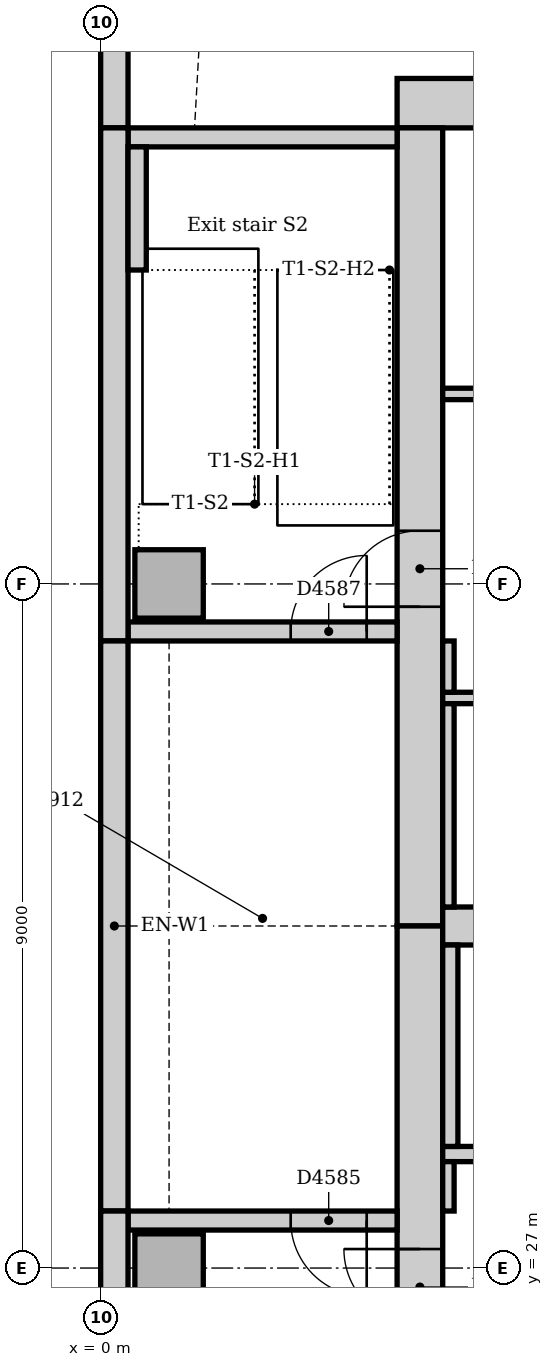
"""IFC4 building model, lengths in metres.
Left out: names, types, materials, properties, quantities, classifications, styles, units other than length and angle.
Written with IfcOpenShell. Run it as: python <this file> out.ifc"""

import sys

from ifc_helpers import new_model, si_unit, direction, frame, frame_2d, origin, origin_2d, place, context, subcontext, project, spatial, rectangle, extrude, element, fill, save


model = new_model("IFC4")
c1 = context("Model", 3, precision=1e-05, world=origin(), true_north=direction((0.0, 1.0)))
c2 = subcontext(c1, "Body", "Model", "MODEL_VIEW")
j1 = project(units=[si_unit("LENGTHUNIT", "METRE"), si_unit("PLANEANGLEUNIT", "RADIAN")], contexts=[c1])
p1 = place(None, origin())
s1 = spatial("IfcSite", under=j1, at=p1, CompositionType="ELEMENT")
p2 = place(p1, origin())
s2 = spatial("IfcBuilding", under=s1, at=p2, CompositionType="ELEMENT")
p3 = place(p2, frame((0.0, 0.0, 165.0)))
s3 = spatial("IfcBuildingStorey", under=s2, at=p3, CompositionType="ELEMENT", Elevation=165.0)
p4 = place(p3, frame((23.15, 42.325, 0.0), z_axis=(0.0, 0.0, 1.0), x_axis=(-1.0, 0.0, 0.0)))
e1 = element("IfcWall", 1, at=p4, inside=s3, PredefinedType="SOLIDWALL", context=c2, shape_type="SweptSolid", body=[
    extrude(rectangle(XDim=19.25, YDim=0.65, at=frame_2d((9.625, 0.0))), origin(), (0.0, 0.0, 1.0), 4.0),
])
p5 = place(p3, frame((4.2, 42.0, 0.0), z_axis=(0.0, 0.0, 1.0), x_axis=(0.0, -1.0, 0.0)))
e2 = element("IfcWall", 2, at=p5, inside=s3, PredefinedType="SOLIDWALL", context=c2, shape_type="SweptSolid", body=[
    extrude(rectangle(XDim=10.5, YDim=0.6, at=frame_2d((5.25, 0.0))), origin(), (0.0, 0.0, 1.0), 4.0),
])
p6 = place(p5, frame((5.3, 0.0, 0.0)))
e3 = element("IfcOpeningElement", 3, at=p6, cuts=e2, PredefinedType="OPENING", context=c2, shape_type="SweptSolid", body=[
    extrude(rectangle(XDim=1.0, YDim=2.1, at=frame_2d((0.5, 1.05))), frame((0.0, 0.31, 0.0), z_axis=(0.0, -1.0, 0.0), x_axis=(1.0, 0.0, 0.0)), (0.0, 0.0, 1.0), 0.62),
])
p7 = place(p3, frame((4.2, 31.5, 0.0), z_axis=(0.0, 0.0, 1.0), x_axis=(0.0, -1.0, 0.0)))
e4 = element("IfcWall", 4, at=p7, inside=s3, PredefinedType="SOLIDWALL", context=c2, shape_type="SweptSolid", body=[
    extrude(rectangle(XDim=10.5, YDim=0.6, at=frame_2d((5.25, 0.0))), origin(), (0.0, 0.0, 1.0), 4.0),
])
p8 = place(p7, frame((4.25, 0.0, 0.0)))
e5 = element("IfcOpeningElement", 5, at=p8, cuts=e4, PredefinedType="OPENING", context=c2, shape_type="SweptSolid", body=[
    extrude(rectangle(XDim=1.0, YDim=2.1, at=frame_2d((0.5, 1.05))), frame((0.0, 0.31, 0.0), z_axis=(0.0, -1.0, 0.0), x_axis=(1.0, 0.0, 0.0)), (0.0, 0.0, 1.0), 0.62),
])
p9 = place(p3, frame((4.5, 31.5, 0.0), z_axis=(0.0, 0.0, 1.0), x_axis=(1.0, 0.0, 0.0)))
e6 = element("IfcWall", 6, at=p9, inside=s3, PredefinedType="SOLIDWALL", context=c2, shape_type="SweptSolid", body=[
    extrude(rectangle(XDim=18.0, YDim=0.5, at=frame_2d((9.0, 0.0))), origin(), (0.0, 0.0, 1.0), 4.0),
])
p10 = place(p3, frame((3.9, 27.625, 0.0), z_axis=(0.0, 0.0, 1.0), x_axis=(-1.0, 0.0, 0.0)))
e7 = element("IfcWall", 7, at=p10, inside=s3, PredefinedType="SOLIDWALL", context=c2, shape_type="SweptSolid", body=[
    extrude(rectangle(XDim=3.54, YDim=0.25, at=frame_2d((1.77, 0.0))), origin(), (0.0, 0.0, 1.0), 4.0),
])
p11 = place(p10, frame((0.4, 0.0, 0.0)))
e8 = element("IfcOpeningElement", 8, at=p11, cuts=e7, PredefinedType="OPENING", context=c2, shape_type="SweptSolid", body=[
    extrude(rectangle(XDim=1.0, YDim=2.1, at=frame_2d((0.5, 1.05))), frame((0.0, 0.135, 0.0), z_axis=(0.0, -1.0, 0.0), x_axis=(1.0, 0.0, 0.0)), (0.0, 0.0, 1.0), 0.27),
])
p12 = place(p3, frame((0.36, 35.375, 0.0), z_axis=(0.0, 0.0, 1.0), x_axis=(1.0, 0.0, 0.0)))
e9 = element("IfcWall", 9, at=p12, inside=s3, PredefinedType="SOLIDWALL", context=c2, shape_type="SweptSolid", body=[
    extrude(rectangle(XDim=3.54, YDim=0.25, at=frame_2d((1.77, 0.0))), origin(), (0.0, 0.0, 1.0), 4.0),
])
p13 = place(p12, frame((2.14, 0.0, 0.0)))
e10 = element("IfcOpeningElement", 10, at=p13, cuts=e9, PredefinedType="OPENING", context=c2, shape_type="SweptSolid", body=[
    extrude(rectangle(XDim=1.0, YDim=2.1, at=frame_2d((0.5, 1.05))), frame((0.0, 0.135, 0.0), z_axis=(0.0, -1.0, 0.0), x_axis=(1.0, 0.0, 0.0)), (0.0, 0.0, 1.0), 0.27),
])
p14 = place(p3, frame((3.9, 41.875, 0.0), z_axis=(0.0, 0.0, 1.0), x_axis=(-1.0, 0.0, 0.0)))
e11 = element("IfcWall", 11, at=p14, inside=s3, PredefinedType="SOLIDWALL", context=c2, shape_type="SweptSolid", body=[
    extrude(rectangle(XDim=3.54, YDim=0.25, at=frame_2d((1.77, 0.0))), origin(), (0.0, 0.0, 1.0), 4.0),
])
for number, where, z_axis, x_axis in (
    (12, (0.9, 27.0, 0.0), (0.0, 0.0, 1.0), (1.0, 0.0, 0.0)),
    (13, (0.9, 36.0, 0.0), (0.0, 0.0, 1.0), (1.0, 0.0, 0.0)),
):
    element("IfcColumn", number, at=place(p3, frame(where, z_axis=z_axis, x_axis=x_axis)), inside=s3, PredefinedType="COLUMN", context=c2, shape_type="SweptSolid", body=[
        extrude(rectangle(XDim=0.9, YDim=0.9, at=origin_2d()), origin(), (0.0, 0.0, 1.0), 4.0),
    ])
p15 = place(p3, frame((0.18, 49.757, 0.0), z_axis=(0.0, 0.0, 1.0), x_axis=(0.0, -1.0, 0.0)))
e14 = element("IfcWall", 14, at=p15, inside=s3, PredefinedType="STANDARD", context=c2, shape_type="SweptSolid", body=[
    extrude(rectangle(XDim=7.757, YDim=0.36, at=frame_2d((3.879, 0.0))), origin(), (0.0, 0.0, 1.0), 3.85),
])
p16 = place(p15, frame((3.107, 0.0, 0.9)))
e15 = element("IfcOpeningElement", 15, at=p16, cuts=e14, PredefinedType="OPENING", context=c2, shape_type="SweptSolid", body=[
    extrude(rectangle(XDim=3.3, YDim=1.6, at=frame_2d((1.65, 0.8))), frame((0.0, 0.19, 0.0), z_axis=(0.0, -1.0, 0.0), x_axis=(1.0, 0.0, 0.0)), (0.0, 0.0, 1.0), 0.38),
])
p17 = place(p3, frame((0.18, 42.0, 0.0), z_axis=(0.0, 0.0, 1.0), x_axis=(0.0, -1.0, 0.0)))
e16 = element("IfcWall", 16, at=p17, inside=s3, PredefinedType="STANDARD", context=c2, shape_type="SweptSolid", body=[
    extrude(rectangle(XDim=6.75, YDim=0.36, at=frame_2d((3.375, 0.0))), origin(), (0.0, 0.0, 1.0), 3.85),
])
p18 = place(p3, frame((0.18, 35.25, 0.0), z_axis=(0.0, 0.0, 1.0), x_axis=(0.0, -1.0, 0.0)))
e17 = element("IfcWall", 17, at=p18, inside=s3, PredefinedType="STANDARD", context=c2, shape_type="SweptSolid", body=[
    extrude(rectangle(XDim=7.5, YDim=0.36, at=frame_2d((3.75, 0.0))), origin(), (0.0, 0.0, 1.0), 3.85),
])
p19 = place(p3, frame((0.18, 27.75, 0.0), z_axis=(0.0, 0.0, 1.0), x_axis=(0.0, -1.0, 0.0)))
e18 = element("IfcWall", 18, at=p19, inside=s3, PredefinedType="STANDARD", context=c2, shape_type="SweptSolid", body=[
    extrude(rectangle(XDim=6.75, YDim=0.36, at=frame_2d((3.375, 0.0))), origin(), (0.0, 0.0, 1.0), 3.85),
])
p20 = place(p3, frame((0.48, 40.13, 0.0), z_axis=(0.0, 0.0, 1.0), x_axis=(0.0, 1.0, 0.0)))
e19 = element("IfcWall", 19, at=p20, inside=s3, PredefinedType="STANDARD", context=c2, shape_type="SweptSolid", body=[
    extrude(rectangle(XDim=1.62, YDim=0.24, at=frame_2d((0.81, 0.0))), origin(), (0.0, 0.0, 1.0), 4.0),
])
p21 = place(p3, frame((4.5, 28.5, 0.0), z_axis=(0.0, 0.0, 1.0), x_axis=(1.0, 0.0, 0.0)))
e20 = element("IfcWall", 20, at=p21, inside=s3, PredefinedType="PARTITIONING", context=c2, shape_type="SweptSolid", body=[
    extrude(rectangle(XDim=18.0, YDim=0.2, at=frame_2d((9.0, 0.0))), origin(), (0.0, 0.0, 1.0), 3.85),
])
p22 = place(p21, frame((0.95, 0.0, 0.0)))
e21 = element("IfcOpeningElement", 21, at=p22, cuts=e20, PredefinedType="OPENING", context=c2, shape_type="SweptSolid", body=[
    extrude(rectangle(XDim=1.1, YDim=2.1, at=frame_2d((0.55, 1.05))), frame((0.0, 0.11, 0.0), z_axis=(0.0, -1.0, 0.0), x_axis=(1.0, 0.0, 0.0)), (0.0, 0.0, 1.0), 0.22),
])
p23 = place(p21, frame((3.95, 0.0, 0.0)))
e22 = element("IfcOpeningElement", 22, at=p23, cuts=e20, PredefinedType="OPENING", context=c2, shape_type="SweptSolid", body=[
    extrude(rectangle(XDim=1.1, YDim=2.1, at=frame_2d((0.55, 1.05))), frame((0.0, 0.11, 0.0), z_axis=(0.0, -1.0, 0.0), x_axis=(1.0, 0.0, 0.0)), (0.0, 0.0, 1.0), 0.22),
])
p24 = place(p21, frame((6.95, 0.0, 0.0)))
e23 = element("IfcOpeningElement", 23, at=p24, cuts=e20, PredefinedType="OPENING", context=c2, shape_type="SweptSolid", body=[
    extrude(rectangle(XDim=1.1, YDim=2.1, at=frame_2d((0.55, 1.05))), frame((0.0, 0.11, 0.0), z_axis=(0.0, -1.0, 0.0), x_axis=(1.0, 0.0, 0.0)), (0.0, 0.0, 1.0), 0.22),
])
p25 = place(p21, frame((9.95, 0.0, 0.0)))
e24 = element("IfcOpeningElement", 24, at=p25, cuts=e20, PredefinedType="OPENING", context=c2, shape_type="SweptSolid", body=[
    extrude(rectangle(XDim=1.1, YDim=2.1, at=frame_2d((0.55, 1.05))), frame((0.0, 0.11, 0.0), z_axis=(0.0, -1.0, 0.0), x_axis=(1.0, 0.0, 0.0)), (0.0, 0.0, 1.0), 0.22),
])
p26 = place(p21, frame((12.95, 0.0, 0.0)))
e25 = element("IfcOpeningElement", 25, at=p26, cuts=e20, PredefinedType="OPENING", context=c2, shape_type="SweptSolid", body=[
    extrude(rectangle(XDim=1.1, YDim=2.1, at=frame_2d((0.55, 1.05))), frame((0.0, 0.11, 0.0), z_axis=(0.0, -1.0, 0.0), x_axis=(1.0, 0.0, 0.0)), (0.0, 0.0, 1.0), 0.22),
])
p27 = place(p21, frame((15.95, 0.0, 0.0)))
e26 = element("IfcOpeningElement", 26, at=p27, cuts=e20, PredefinedType="OPENING", context=c2, shape_type="SweptSolid", body=[
    extrude(rectangle(XDim=1.1, YDim=2.1, at=frame_2d((0.55, 1.05))), frame((0.0, 0.11, 0.0), z_axis=(0.0, -1.0, 0.0), x_axis=(1.0, 0.0, 0.0)), (0.0, 0.0, 1.0), 0.22),
])
p28 = place(p3, frame((4.6, 28.6, 0.0), z_axis=(0.0, 0.0, 1.0), x_axis=(0.0, 1.0, 0.0)))
e27 = element("IfcWall", 27, at=p28, inside=s3, PredefinedType="PARTITIONING", context=c2, shape_type="SweptSolid", body=[
    extrude(rectangle(XDim=2.65, YDim=0.2, at=frame_2d((1.325, 0.0))), origin(), (0.0, 0.0, 1.0), 3.85),
])
p29 = place(p3, frame((4.5, 38.5, 0.0), z_axis=(0.0, 0.0, 1.0), x_axis=(1.0, 0.0, 0.0)))
e28 = element("IfcWall", 28, at=p29, inside=s3, PredefinedType="PARTITIONING", context=c2, shape_type="SweptSolid", body=[
    extrude(rectangle(XDim=11.9, YDim=0.15, at=frame_2d((5.95, 0.0))), origin(), (0.0, 0.0, 1.0), 3.85),
])
p30 = place(p29, frame((1.1, 0.0, 0.0)))
e29 = element("IfcOpeningElement", 29, at=p30, cuts=e28, PredefinedType="OPENING", context=c2, shape_type="SweptSolid", body=[
    extrude(rectangle(XDim=0.9, YDim=2.1, at=frame_2d((0.45, 1.05))), frame((0.0, 0.085, 0.0), z_axis=(0.0, -1.0, 0.0), x_axis=(1.0, 0.0, 0.0)), (0.0, 0.0, 1.0), 0.17),
])
p31 = place(p29, frame((4.05, 0.0, 0.0)))
e30 = element("IfcOpeningElement", 30, at=p31, cuts=e28, PredefinedType="OPENING", context=c2, shape_type="SweptSolid", body=[
    extrude(rectangle(XDim=0.9, YDim=2.1, at=frame_2d((0.45, 1.05))), frame((0.0, 0.085, 0.0), z_axis=(0.0, -1.0, 0.0), x_axis=(1.0, 0.0, 0.0)), (0.0, 0.0, 1.0), 0.17),
])
p32 = place(p29, frame((7.05, 0.0, 0.0)))
e31 = element("IfcOpeningElement", 31, at=p32, cuts=e28, PredefinedType="OPENING", context=c2, shape_type="SweptSolid", body=[
    extrude(rectangle(XDim=0.9, YDim=2.1, at=frame_2d((0.45, 1.05))), frame((0.0, 0.085, 0.0), z_axis=(0.0, -1.0, 0.0), x_axis=(1.0, 0.0, 0.0)), (0.0, 0.0, 1.0), 0.17),
])
p33 = place(p29, frame((9.95, 0.0, 0.0)))
e32 = element("IfcOpeningElement", 32, at=p33, cuts=e28, PredefinedType="OPENING", context=c2, shape_type="SweptSolid", body=[
    extrude(rectangle(XDim=0.8, YDim=2.1, at=frame_2d((0.4, 1.05))), frame((0.0, 0.085, 0.0), z_axis=(0.0, -1.0, 0.0), x_axis=(1.0, 0.0, 0.0)), (0.0, 0.0, 1.0), 0.17),
])
p34 = place(p3, frame((4.5, 34.5, 0.0), z_axis=(0.0, 0.0, 1.0), x_axis=(1.0, 0.0, 0.0)))
e33 = element("IfcWall", 33, at=p34, inside=s3, PredefinedType="PARTITIONING", context=c2, shape_type="SweptSolid", body=[
    extrude(rectangle(XDim=5.9, YDim=0.15, at=frame_2d((2.95, 0.0))), origin(), (0.0, 0.0, 1.0), 3.85),
])
p35 = place(p34, frame((2.5, 0.0, 0.0)))
e34 = element("IfcOpeningElement", 34, at=p35, cuts=e33, PredefinedType="OPENING", context=c2, shape_type="SweptSolid", body=[
    extrude(rectangle(XDim=0.9, YDim=2.1, at=frame_2d((0.45, 1.05))), frame((0.0, 0.085, 0.0), z_axis=(0.0, -1.0, 0.0), x_axis=(1.0, 0.0, 0.0)), (0.0, 0.0, 1.0), 0.17),
])
p36 = place(p3, frame((4.575, 34.575, 0.0), z_axis=(0.0, 0.0, 1.0), x_axis=(0.0, 1.0, 0.0)))
e35 = element("IfcWall", 35, at=p36, inside=s3, PredefinedType="PARTITIONING", context=c2, shape_type="SweptSolid", body=[
    extrude(rectangle(XDim=0.675, YDim=0.15, at=frame_2d((0.338, 0.0))), origin(), (0.0, 0.0, 1.0), 3.85),
])
p37 = place(p3, frame((4.575, 31.75, 0.0), z_axis=(0.0, 0.0, 1.0), x_axis=(0.0, 1.0, 0.0)))
e36 = element("IfcWall", 36, at=p37, inside=s3, PredefinedType="PARTITIONING", context=c2, shape_type="SweptSolid", body=[
    extrude(rectangle(XDim=2.675, YDim=0.15, at=frame_2d((1.337, 0.0))), origin(), (0.0, 0.0, 1.0), 3.85),
])
p38 = place(p3, frame((4.575, 27.75, 0.0), z_axis=(0.0, 0.0, 1.0), x_axis=(0.0, 1.0, 0.0)))
e37 = element("IfcWall", 37, at=p38, inside=s3, PredefinedType="PARTITIONING", context=c2, shape_type="SweptSolid", body=[
    extrude(rectangle(XDim=0.65, YDim=0.15, at=frame_2d((0.325, 0.0))), origin(), (0.0, 0.0, 1.0), 3.85),
])
p39 = place(p8, frame((1.0, 0.0, 0.0), z_axis=(0.0, 0.0, 1.0), x_axis=(-1.0, 0.0, 0.0)))
e38 = element("IfcDoor", 38, at=p39, inside=s3, OperationType="SINGLE_SWING_RIGHT", PredefinedType="DOOR", context=c2, shape_type="SweptSolid", body=[
    extrude(rectangle(XDim=1.0, YDim=2.1, at=frame_2d((0.5, 1.05))), frame((0.0, 0.025, 0.0), z_axis=(0.0, -1.0, 0.0), x_axis=(1.0, 0.0, 0.0)), (0.0, 0.0, 1.0), 0.05),
])
fill(e5, e38)
p40 = place(p11, origin())
e39 = element("IfcDoor", 39, at=p40, inside=s3, OperationType="SINGLE_SWING_LEFT", PredefinedType="DOOR", context=c2, shape_type="SweptSolid", body=[
    extrude(rectangle(XDim=1.0, YDim=2.1, at=frame_2d((0.5, 1.05))), frame((0.0, 0.025, 0.0), z_axis=(0.0, -1.0, 0.0), x_axis=(1.0, 0.0, 0.0)), (0.0, 0.0, 1.0), 0.05),
])
fill(e8, e39)
p41 = place(p6, frame((1.0, 0.0, 0.0), z_axis=(0.0, 0.0, 1.0), x_axis=(-1.0, 0.0, 0.0)))
e40 = element("IfcDoor", 40, at=p41, inside=s3, OperationType="SINGLE_SWING_LEFT", PredefinedType="DOOR", context=c2, shape_type="SweptSolid", body=[
    extrude(rectangle(XDim=1.0, YDim=2.1, at=frame_2d((0.5, 1.05))), frame((0.0, 0.025, 0.0), z_axis=(0.0, -1.0, 0.0), x_axis=(1.0, 0.0, 0.0)), (0.0, 0.0, 1.0), 0.05),
])
fill(e3, e40)
p42 = place(p13, origin())
e41 = element("IfcDoor", 41, at=p42, inside=s3, OperationType="SINGLE_SWING_RIGHT", PredefinedType="DOOR", context=c2, shape_type="SweptSolid", body=[
    extrude(rectangle(XDim=1.0, YDim=2.1, at=frame_2d((0.5, 1.05))), frame((0.0, 0.025, 0.0), z_axis=(0.0, -1.0, 0.0), x_axis=(1.0, 0.0, 0.0)), (0.0, 0.0, 1.0), 0.05),
])
fill(e10, e41)
save(model, sys.argv[1])
